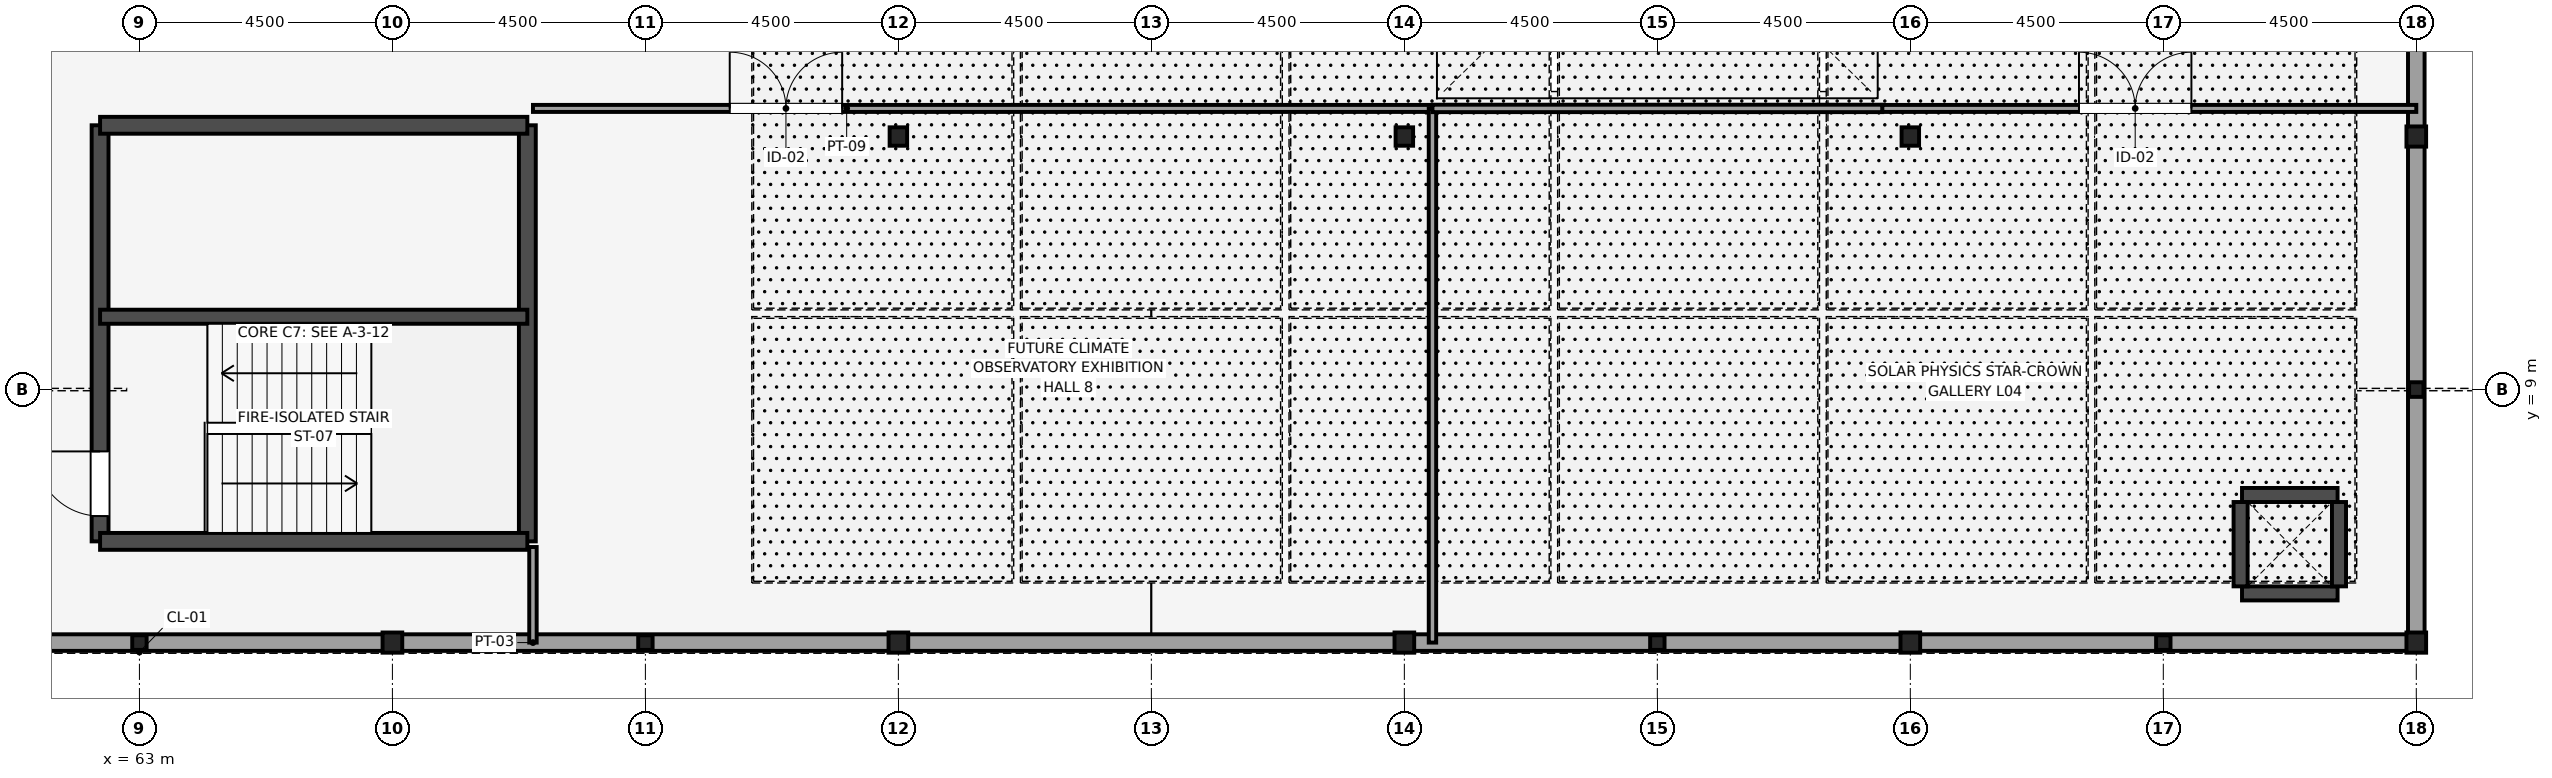
"""IFC4 building model, lengths in metres.
Left out: names, types, materials, properties, quantities, classifications, styles, units other than length and angle.
Written with IfcOpenShell. Run it as: python <this file> out.ifc"""

import sys

from ifc_helpers import new_model, si_unit, direction, frame, frame_2d, origin, origin_2d, place, context, subcontext, project, spatial, rectangle, i_section, extrude, element, fill, save


model = new_model("IFC4")
c1 = context("Model", 3, precision=1e-05, world=origin(), true_north=direction((0.0, 1.0)))
c2 = subcontext(c1, "Body", "Model", "MODEL_VIEW")
j1 = project(units=[si_unit("LENGTHUNIT", "METRE"), si_unit("PLANEANGLEUNIT", "RADIAN")], contexts=[c1])
p1 = place(None, origin())
s1 = spatial("IfcSite", under=j1, at=p1, CompositionType="ELEMENT")
p2 = place(p1, origin())
s2 = spatial("IfcBuilding", under=s1, at=p2, CompositionType="ELEMENT")
p3 = place(p2, frame((0.0, 0.0, 18.9)))
s3 = spatial("IfcBuildingStorey", under=s2, at=p3, CompositionType="ELEMENT", Elevation=18.9)
for number, where, z_axis, x_axis in (
    (1, (67.5, 4.5, 0.0), (0.0, 0.0, 1.0), (1.0, 0.0, 0.0)),
    (2, (76.5, 4.5, 0.0), (0.0, 0.0, 1.0), (1.0, 0.0, 0.0)),
):
    element("IfcColumn", number, at=place(p3, frame(where, z_axis=z_axis, x_axis=x_axis)), inside=s3, PredefinedType="COLUMN", context=c2, shape_type="SweptSolid", body=[
        extrude(i_section(OverallWidth=0.35, OverallDepth=0.359, WebThickness=0.016, FlangeThickness=0.024, FilletRadius=0.014, at=origin_2d()), origin(), (0.0, 0.0, 1.0), 4.5),
    ])
p4 = place(p3, frame((76.5, 13.5, 0.0), z_axis=(0.0, 0.0, 1.0), x_axis=(1.0, 0.0, 0.0)))
e3 = element("IfcColumn", 3, at=p4, inside=s3, PredefinedType="COLUMN", context=c2, shape_type="SweptSolid", body=[
    extrude(i_section(OverallWidth=0.311, OverallDepth=0.327, WebThickness=0.016, FlangeThickness=0.025, FilletRadius=0.017, at=origin_2d()), origin(), (0.0, 0.0, 1.0), 4.5),
])
p5 = place(p3, frame((85.5, 4.5, 0.0), z_axis=(0.0, 0.0, 1.0), x_axis=(1.0, 0.0, 0.0)))
e4 = element("IfcColumn", 4, at=p5, inside=s3, PredefinedType="COLUMN", context=c2, shape_type="SweptSolid", body=[
    extrude(i_section(OverallWidth=0.35, OverallDepth=0.359, WebThickness=0.016, FlangeThickness=0.024, FilletRadius=0.014, at=origin_2d()), origin(), (0.0, 0.0, 1.0), 4.5),
])
p6 = place(p3, frame((85.5, 13.5, 0.0), z_axis=(0.0, 0.0, 1.0), x_axis=(1.0, 0.0, 0.0)))
e5 = element("IfcColumn", 5, at=p6, inside=s3, PredefinedType="COLUMN", context=c2, shape_type="SweptSolid", body=[
    extrude(i_section(OverallWidth=0.311, OverallDepth=0.327, WebThickness=0.016, FlangeThickness=0.025, FilletRadius=0.017, at=origin_2d()), origin(), (0.0, 0.0, 1.0), 4.5),
])
p7 = place(p3, frame((94.5, 4.5, 0.0), z_axis=(0.0, 0.0, 1.0), x_axis=(1.0, 0.0, 0.0)))
e6 = element("IfcColumn", 6, at=p7, inside=s3, PredefinedType="COLUMN", context=c2, shape_type="SweptSolid", body=[
    extrude(i_section(OverallWidth=0.35, OverallDepth=0.359, WebThickness=0.016, FlangeThickness=0.024, FilletRadius=0.014, at=origin_2d()), origin(), (0.0, 0.0, 1.0), 4.5),
])
p8 = place(p3, frame((94.5, 13.5, 0.0), z_axis=(0.0, 0.0, 1.0), x_axis=(1.0, 0.0, 0.0)))
e7 = element("IfcColumn", 7, at=p8, inside=s3, PredefinedType="COLUMN", context=c2, shape_type="SweptSolid", body=[
    extrude(i_section(OverallWidth=0.311, OverallDepth=0.327, WebThickness=0.016, FlangeThickness=0.025, FilletRadius=0.017, at=origin_2d()), origin(), (0.0, 0.0, 1.0), 4.5),
])
for number, where, z_axis, x_axis in (
    (8, (103.5, 4.5, 0.0), (0.0, 0.0, 1.0), (1.0, 0.0, 0.0)),
    (9, (103.5, 13.5, 0.0), (0.0, 0.0, 1.0), (1.0, 0.0, 0.0)),
):
    element("IfcColumn", number, at=place(p3, frame(where, z_axis=z_axis, x_axis=x_axis)), inside=s3, PredefinedType="COLUMN", context=c2, shape_type="SweptSolid", body=[
        extrude(i_section(OverallWidth=0.35, OverallDepth=0.359, WebThickness=0.016, FlangeThickness=0.024, FilletRadius=0.014, at=origin_2d()), origin(), (0.0, 0.0, 1.0), 4.5),
    ])
for number, where, z_axis, x_axis in (
    (10, (63.0, 4.5, 0.0), (0.0, 0.0, 1.0), (1.0, 0.0, 0.0)),
    (11, (72.0, 4.5, 0.0), (0.0, 0.0, 1.0), (1.0, 0.0, 0.0)),
    (12, (90.0, 4.5, 0.0), (0.0, 0.0, 1.0), (1.0, 0.0, 0.0)),
    (13, (99.0, 4.5, 0.0), (0.0, 0.0, 1.0), (1.0, 0.0, 0.0)),
    (14, (103.5, 9.0, 0.0), (0.0, 0.0, 1.0), (1.0, 0.0, 0.0)),
):
    element("IfcColumn", number, at=place(p3, frame(where, z_axis=z_axis, x_axis=x_axis)), inside=s3, PredefinedType="PILASTER", context=c2, shape_type="SweptSolid", body=[
        extrude(i_section(OverallWidth=0.256, OverallDepth=0.26, WebThickness=0.01, FlangeThickness=0.017, FilletRadius=0.014, at=origin_2d()), origin(), (0.0, 0.0, 1.0), 4.5),
    ])
p9 = place(p3, frame((62.3, 6.3, 0.0), z_axis=(0.0, 0.0, 1.0), x_axis=(0.0, 1.0, 0.0)))
e15 = element("IfcWall", 15, at=p9, inside=s3, PredefinedType="SHEAR", context=c2, shape_type="SweptSolid", body=[
    extrude(rectangle(XDim=7.4, YDim=0.3, at=frame_2d((3.7, 0.0))), origin(), (0.0, 0.0, 1.0), 4.34),
])
p10 = place(p9, frame((0.45, 0.0, 0.0)))
e16 = element("IfcOpeningElement", 16, at=p10, cuts=e15, PredefinedType="OPENING", context=c2, shape_type="SweptSolid", body=[
    extrude(rectangle(XDim=1.15, YDim=2.15, at=frame_2d((0.575, 1.075))), frame((0.0, 0.16, 0.0), z_axis=(0.0, -1.0, 0.0), x_axis=(1.0, 0.0, 0.0)), (0.0, 0.0, 1.0), 0.32),
])
p11 = place(p3, frame((69.9, 6.3, 0.0), z_axis=(0.0, 0.0, 1.0), x_axis=(0.0, 1.0, 0.0)))
e17 = element("IfcWall", 17, at=p11, inside=s3, PredefinedType="SHEAR", context=c2, shape_type="SweptSolid", body=[
    extrude(rectangle(XDim=7.4, YDim=0.3, at=frame_2d((3.7, 0.0))), origin(), (0.0, 0.0, 1.0), 4.34),
])
for number, where, z_axis, x_axis in (
    (18, (62.3, 6.3, 0.0), (0.0, 0.0, 1.0), (1.0, 0.0, 0.0)),
    (19, (62.3, 13.7, 0.0), (0.0, 0.0, 1.0), (1.0, 0.0, 0.0)),
):
    element("IfcWall", number, at=place(p3, frame(where, z_axis=z_axis, x_axis=x_axis)), inside=s3, PredefinedType="SHEAR", context=c2, shape_type="SweptSolid", body=[
        extrude(rectangle(XDim=7.6, YDim=0.3, at=frame_2d((3.8, 0.0))), origin(), (0.0, 0.0, 1.0), 4.34),
    ])
p12 = place(p3, frame((62.3, 10.295, 0.0), z_axis=(0.0, 0.0, 1.0), x_axis=(1.0, 0.0, 0.0)))
e20 = element("IfcWall", 20, at=p12, inside=s3, PredefinedType="SHEAR", context=c2, shape_type="SweptSolid", body=[
    extrude(rectangle(XDim=7.6, YDim=0.25, at=frame_2d((3.8, 0.0))), origin(), (0.0, 0.0, 1.0), 4.34),
])
for number, where, z_axis, x_axis in (
    (21, (100.4, 5.375, 0.0), (0.0, 0.0, 1.0), (1.0, 0.0, 0.0)),
    (22, (100.4, 7.125, 0.0), (0.0, 0.0, 1.0), (1.0, 0.0, 0.0)),
):
    element("IfcWall", number, at=place(p3, frame(where, z_axis=z_axis, x_axis=x_axis)), inside=s3, PredefinedType="SHEAR", context=c2, shape_type="SweptSolid", body=[
        extrude(rectangle(XDim=1.7, YDim=0.25, at=frame_2d((0.85, 0.0))), origin(), (0.0, 0.0, 1.0), 3.77),
    ])
for number, where, z_axis, x_axis in (
    (23, (100.375, 5.5, 0.0), (0.0, 0.0, 1.0), (0.0, 1.0, 0.0)),
    (24, (102.125, 5.5, 0.0), (0.0, 0.0, 1.0), (0.0, 1.0, 0.0)),
):
    element("IfcWall", number, at=place(p3, frame(where, z_axis=z_axis, x_axis=x_axis)), inside=s3, PredefinedType="SHEAR", context=c2, shape_type="SweptSolid", body=[
        extrude(rectangle(XDim=1.5, YDim=0.25, at=frame_2d((0.75, 0.0))), origin(), (0.0, 0.0, 1.0), 3.77),
    ])
for number, where, z_axis, x_axis in (
    (25, (58.5, 4.5, 0.0), (0.0, 0.0, 1.0), (1.0, 0.0, 0.0)),
    (26, (67.5, 4.5, 0.0), (0.0, 0.0, 1.0), (1.0, 0.0, 0.0)),
    (27, (76.5, 4.5, 0.0), (0.0, 0.0, 1.0), (1.0, 0.0, 0.0)),
    (28, (85.5, 4.5, 0.0), (0.0, 0.0, 1.0), (1.0, 0.0, 0.0)),
    (29, (94.5, 4.5, 0.0), (0.0, 0.0, 1.0), (1.0, 0.0, 0.0)),
    (30, (103.5, 4.5, 0.0), (0.0, 0.0, 1.0), (0.0, 1.0, 0.0)),
    (31, (103.5, 13.5, 0.0), (0.0, 0.0, 1.0), (0.0, 1.0, 0.0)),
):
    element("IfcWall", number, at=place(p3, frame(where, z_axis=z_axis, x_axis=x_axis)), inside=s3, PredefinedType="STANDARD", context=c2, shape_type="SweptSolid", body=[
        extrude(rectangle(XDim=9.0, YDim=0.295, at=frame_2d((4.5, 0.0))), origin(), (0.0, 0.0, 1.0), 3.846),
    ])
p13 = place(p3, frame((70.0, 4.5, 0.0), z_axis=(0.0, 0.0, 1.0), x_axis=(0.0, 1.0, 0.0)))
e32 = element("IfcWall", 32, at=p13, inside=s3, PredefinedType="PARTITIONING", context=c2, shape_type="SweptSolid", body=[
    extrude(rectangle(XDim=1.7, YDim=0.132, at=frame_2d((0.85, 0.0))), origin(), (0.0, 0.0, 1.0), 4.32),
])
p14 = place(p3, frame((70.0, 14.0, 0.0), z_axis=(0.0, 0.0, 1.0), x_axis=(1.0, 0.0, 0.0)))
e33 = element("IfcWall", 33, at=p14, inside=s3, PredefinedType="MOVABLE", context=c2, shape_type="SweptSolid", body=[
    extrude(rectangle(XDim=16.0, YDim=0.125, at=frame_2d((8.0, 0.0))), origin(), (0.0, 0.0, 1.0), 4.32),
])
p15 = place(p14, frame((3.5, 0.0, 0.0)))
e34 = element("IfcOpeningElement", 34, at=p15, cuts=e33, PredefinedType="OPENING", context=c2, shape_type="SweptSolid", body=[
    extrude(rectangle(XDim=2.0, YDim=2.4, at=frame_2d((1.0, 1.2))), frame((0.0, 0.073, 0.0), z_axis=(0.0, -1.0, 0.0), x_axis=(1.0, 0.0, 0.0)), (0.0, 0.0, 1.0), 0.145),
])
p16 = place(p3, frame((86.0, 4.5, 0.0), z_axis=(0.0, 0.0, 1.0), x_axis=(0.0, 1.0, 0.0)))
e35 = element("IfcWall", 35, at=p16, inside=s3, PredefinedType="PARTITIONING", context=c2, shape_type="SweptSolid", body=[
    extrude(rectangle(XDim=9.5, YDim=0.132, at=frame_2d((4.75, 0.0))), origin(), (0.0, 0.0, 1.0), 4.32),
])
p17 = place(p3, frame((94.0, 14.0, 0.0), z_axis=(0.0, 0.0, 1.0), x_axis=(1.0, 0.0, 0.0)))
e36 = element("IfcWall", 36, at=p17, inside=s3, PredefinedType="MOVABLE", context=c2, shape_type="SweptSolid", body=[
    extrude(rectangle(XDim=9.5, YDim=0.125, at=frame_2d((4.75, 0.0))), origin(), (0.0, 0.0, 1.0), 4.32),
])
p18 = place(p17, frame((3.5, 0.0, 0.0)))
e37 = element("IfcOpeningElement", 37, at=p18, cuts=e36, PredefinedType="OPENING", context=c2, shape_type="SweptSolid", body=[
    extrude(rectangle(XDim=2.0, YDim=2.4, at=frame_2d((1.0, 1.2))), frame((0.0, 0.073, 0.0), z_axis=(0.0, -1.0, 0.0), x_axis=(1.0, 0.0, 0.0)), (0.0, 0.0, 1.0), 0.145),
])
p19 = place(p3, frame((86.0, 14.0, 0.0), z_axis=(0.0, 0.0, 1.0), x_axis=(1.0, 0.0, 0.0)))
e38 = element("IfcWall", 38, at=p19, inside=s3, PredefinedType="PARTITIONING", context=c2, shape_type="SweptSolid", body=[
    extrude(rectangle(XDim=8.0, YDim=0.132, at=frame_2d((4.0, 0.0))), origin(), (0.0, 0.0, 1.0), 4.32),
])
p20 = place(p10, origin())
e39 = element("IfcDoor", 39, at=p20, inside=s3, OperationType="SINGLE_SWING_RIGHT", PredefinedType="DOOR", context=c2, shape_type="SweptSolid", body=[
    extrude(rectangle(XDim=1.15, YDim=2.15, at=frame_2d((0.575, 1.075))), frame((0.0, 0.025, 0.0), z_axis=(0.0, -1.0, 0.0), x_axis=(1.0, 0.0, 0.0)), (0.0, 0.0, 1.0), 0.05),
])
fill(e16, e39)
p21 = place(p15, origin())
e40 = element("IfcDoor", 40, at=p21, inside=s3, OperationType="DOUBLE_DOOR_DOUBLE_SWING", PredefinedType="DOOR", context=c2, shape_type="SweptSolid", body=[
    extrude(rectangle(XDim=2.0, YDim=2.4, at=frame_2d((1.0, 1.2))), frame((0.0, 0.025, 0.0), z_axis=(0.0, -1.0, 0.0), x_axis=(1.0, 0.0, 0.0)), (0.0, 0.0, 1.0), 0.05),
])
fill(e34, e40)
p22 = place(p18, origin())
e41 = element("IfcDoor", 41, at=p22, inside=s3, OperationType="DOUBLE_DOOR_DOUBLE_SWING", PredefinedType="DOOR", context=c2, shape_type="SweptSolid", body=[
    extrude(rectangle(XDim=2.0, YDim=2.4, at=frame_2d((1.0, 1.2))), frame((0.0, 0.025, 0.0), z_axis=(0.0, -1.0, 0.0), x_axis=(1.0, 0.0, 0.0)), (0.0, 0.0, 1.0), 0.05),
])
fill(e37, e41)
save(model, sys.argv[1])
